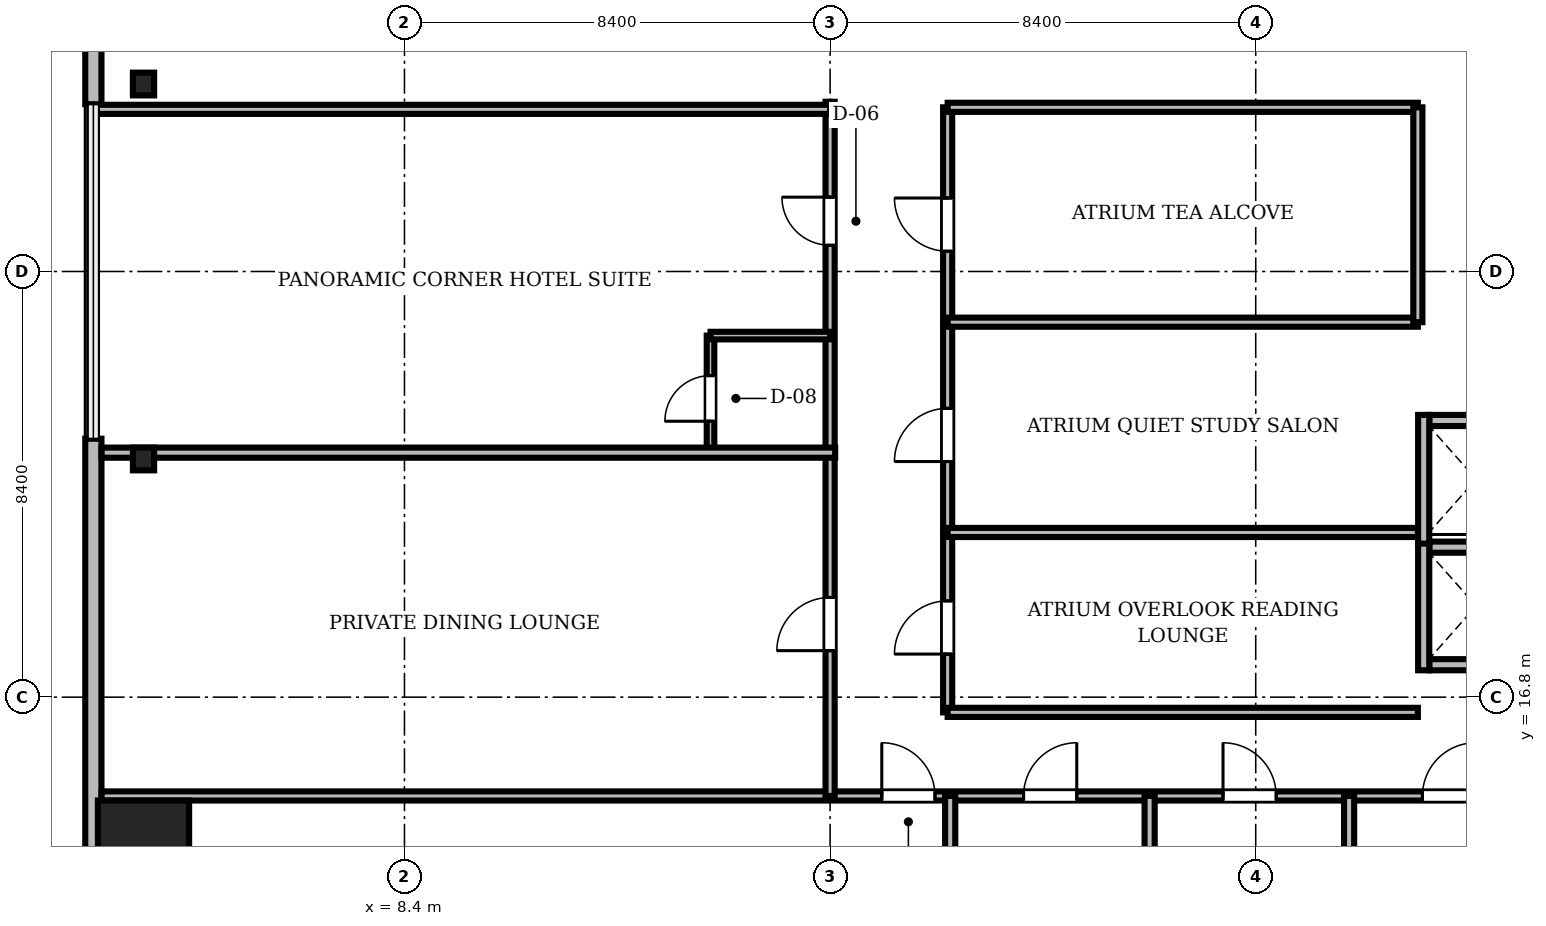
"""IFC4 building model, lengths in metres.
Left out: names, types, materials, properties, quantities, classifications, styles, units other than length and angle.
Written with IfcOpenShell. Run it as: python <this file> out.ifc"""

import sys

from ifc_helpers import new_model, si_unit, direction, frame, frame_2d, origin, origin_2d, place, context, subcontext, project, spatial, rectangle, i_section, extrude, source, transform, mapped, element, fill, save


model = new_model("IFC4")
c1 = context("Model", 3, precision=1e-05, world=origin(), true_north=direction((0.0, 1.0)))
c2 = subcontext(c1, "Body", "Model", "MODEL_VIEW")
j1 = project(units=[si_unit("LENGTHUNIT", "METRE"), si_unit("PLANEANGLEUNIT", "RADIAN")], contexts=[c1])
p1 = place(None, origin())
s1 = spatial("IfcSite", under=j1, at=p1, CompositionType="ELEMENT")
p2 = place(p1, origin())
s2 = spatial("IfcBuilding", under=s1, at=p2, CompositionType="ELEMENT")
p3 = place(p2, frame((0.0, 0.0, 56.8)))
s3 = spatial("IfcBuildingStorey", under=s2, at=p3, CompositionType="ELEMENT", Elevation=56.8)
m1 = source(origin(), c2, "Body", "SweptSolid", [
    extrude(rectangle(XDim=1.8, YDim=1.8, at=origin_2d()), origin(), (0.0, 0.0, 1.0), 3.41),
])
p4 = place(p3, frame((3.25, 13.86, 0.0), z_axis=(0.0, 0.0, 1.0), x_axis=(1.0, 0.0, 0.0)))
e1 = element("IfcColumn", 1, at=p4, inside=s3, PredefinedType="COLUMN", context=c2, shape_type="MappedRepresentation", body=[
    mapped(m1, transform((0.0, 0.0, 0.0), scale=1.0)),
])
m2 = source(origin(), c2, "Body", "SweptSolid", [
    extrude(i_section(OverallWidth=0.419, OverallDepth=0.449, WebThickness=0.031, FlangeThickness=0.048, FilletRadius=0.015, at=origin_2d()), origin(), (0.0, 0.0, 1.0), 3.41),
])
for number, where, z_axis, x_axis in (
    (2, (3.25, 28.9, 0.0), (0.0, 0.0, 1.0), (1.0, 0.0, 0.0)),
    (3, (3.25, 21.5, 0.0), (0.0, 0.0, 1.0), (1.0, 0.0, 0.0)),
):
    element("IfcColumn", number, at=place(p3, frame(where, z_axis=z_axis, x_axis=x_axis)), inside=s3, PredefinedType="COLUMN", context=c2, shape_type="MappedRepresentation", body=[
        mapped(m2, transform((0.0, 0.0, 0.0), scale=1.0)),
    ])
m3 = source(origin(), c2, "Body", "SweptSolid", [
    extrude(rectangle(XDim=15.6, YDim=0.32, at=frame_2d((7.8, 0.0))), origin(), (0.0, 0.0, 1.0), 3.41),
])
p5 = place(p3, frame((2.26, 44.1, 0.0), z_axis=(0.0, 0.0, 1.0), x_axis=(0.0, -1.0, 0.0)))
e4 = element("IfcWall", 4, at=p5, inside=s3, PredefinedType="SOLIDWALL", context=c2, shape_type="MappedRepresentation", body=[
    mapped(m3, transform((0.0, 0.0, 0.0), scale=1.0)),
])
m4 = source(origin(), c2, "Body", "SweptSolid", [
    extrude(rectangle(XDim=1.4, YDim=2.3, at=frame_2d((0.7, 1.15))), frame((0.0, 0.17, 0.0), z_axis=(0.0, -1.0, 0.0), x_axis=(1.0, 0.0, 0.0)), (0.0, 0.0, 1.0), 0.34),
])
p6 = place(p5, frame((9.61, 0.0, 0.0)))
e5 = element("IfcOpeningElement", 5, at=p6, cuts=e4, PredefinedType="OPENING", context=c2, shape_type="MappedRepresentation", body=[
    mapped(m4, transform((0.0, 0.0, 0.0), scale=1.0)),
])
m5 = source(origin(), c2, "Body", "SweptSolid", [
    extrude(rectangle(XDim=2.8, YDim=2.4, at=frame_2d((1.4, 1.2))), frame((0.0, 0.17, 0.0), z_axis=(0.0, -1.0, 0.0), x_axis=(1.0, 0.0, 0.0)), (0.0, 0.0, 1.0), 0.34),
])
p7 = place(p5, frame((2.705, 0.0, 0.72)))
e6 = element("IfcOpeningElement", 6, at=p7, cuts=e4, PredefinedType="OPENING", context=c2, shape_type="MappedRepresentation", body=[
    mapped(m5, transform((0.0, 0.0, 0.0), scale=1.0)),
])
m6 = source(origin(), c2, "Body", "SweptSolid", [
    extrude(rectangle(XDim=15.6, YDim=0.32, at=frame_2d((7.8, 0.0))), origin(), (0.0, 0.0, 1.0), 3.41),
])
p8 = place(p3, frame((2.26, 21.9, 0.0), z_axis=(0.0, 0.0, 1.0), x_axis=(0.0, -1.0, 0.0)))
e7 = element("IfcWall", 7, at=p8, inside=s3, PredefinedType="SOLIDWALL", context=c2, shape_type="MappedRepresentation", body=[
    mapped(m6, transform((0.0, 0.0, 0.0), scale=1.0)),
])
p9 = place(p8, frame((10.095, 0.0, 0.72)))
e8 = element("IfcOpeningElement", 8, at=p9, cuts=e7, PredefinedType="OPENING", context=c2, shape_type="MappedRepresentation", body=[
    mapped(m5, transform((0.0, 0.0, 0.0), scale=1.0)),
])
m7 = source(origin(), c2, "Body", "SweptSolid", [
    extrude(rectangle(XDim=1.85, YDim=0.22, at=frame_2d((0.925, 0.0))), origin(), (0.0, 0.0, 1.0), 3.41),
])
for number, where, z_axis, x_axis in (
    (9, (28.625, 17.44, 0.0), (0.0, 0.0, 1.0), (1.0, 0.0, 0.0)),
    (10, (28.625, 19.76, 0.0), (0.0, 0.0, 1.0), (1.0, 0.0, 0.0)),
):
    element("IfcWall", number, at=place(p3, frame(where, z_axis=z_axis, x_axis=x_axis)), inside=s3, PredefinedType="SOLIDWALL", context=c2, shape_type="MappedRepresentation", body=[
        mapped(m7, transform((0.0, 0.0, 0.0), scale=1.0)),
    ])
m8 = source(origin(), c2, "Body", "SweptSolid", [
    extrude(rectangle(XDim=2.54, YDim=0.22, at=frame_2d((1.27, 0.0))), origin(), (0.0, 0.0, 1.0), 3.41),
])
p10 = place(p3, frame((28.515, 17.33, 0.0), z_axis=(0.0, 0.0, 1.0), x_axis=(0.0, 1.0, 0.0)))
e11 = element("IfcWall", 11, at=p10, inside=s3, PredefinedType="SOLIDWALL", context=c2, shape_type="MappedRepresentation", body=[
    mapped(m8, transform((0.0, 0.0, 0.0), scale=1.0)),
])
p11 = place(p3, frame((28.625, 22.26, 0.0), z_axis=(0.0, 0.0, 1.0), x_axis=(1.0, 0.0, 0.0)))
e12 = element("IfcWall", 12, at=p11, inside=s3, PredefinedType="SOLIDWALL", context=c2, shape_type="MappedRepresentation", body=[
    mapped(m7, transform((0.0, 0.0, 0.0), scale=1.0)),
])
p12 = place(p3, frame((28.515, 19.83, 0.0), z_axis=(0.0, 0.0, 1.0), x_axis=(0.0, 1.0, 0.0)))
e13 = element("IfcWall", 13, at=p12, inside=s3, PredefinedType="SOLIDWALL", context=c2, shape_type="MappedRepresentation", body=[
    mapped(m8, transform((0.0, 0.0, 0.0), scale=1.0)),
])
m9 = source(origin(), c2, "Body", "SweptSolid", [
    extrude(rectangle(XDim=46.156, YDim=0.18, at=frame_2d((23.078, 0.0))), origin(), (0.0, 0.0, 1.0), 2.652),
])
p13 = place(p3, frame((2.422, 14.85, 0.0), z_axis=(0.0, 0.0, 1.0), x_axis=(1.0, 0.0, 0.0)))
e14 = element("IfcWall", 14, at=p13, inside=s3, PredefinedType="PARTITIONING", context=c2, shape_type="MappedRepresentation", body=[
    mapped(m9, transform((0.0, 0.0, 0.0), scale=1.0)),
])
m10 = source(origin(), c2, "Body", "SweptSolid", [
    extrude(rectangle(XDim=1.05, YDim=2.2, at=frame_2d((0.525, 1.1))), frame((0.0, 0.1, 0.0), z_axis=(0.0, -1.0, 0.0), x_axis=(1.0, 0.0, 0.0)), (0.0, 0.0, 1.0), 0.2),
])
p14 = place(p13, frame((15.398, 0.0, 0.0)))
e15 = element("IfcOpeningElement", 15, at=p14, cuts=e14, PredefinedType="OPENING", context=c2, shape_type="MappedRepresentation", body=[
    mapped(m10, transform((0.0, 0.0, 0.0), scale=1.0)),
])
p15 = place(p13, frame((18.196, 0.0, 0.0)))
e16 = element("IfcOpeningElement", 16, at=p15, cuts=e14, PredefinedType="OPENING", context=c2, shape_type="MappedRepresentation", body=[
    mapped(m10, transform((0.0, 0.0, 0.0), scale=1.0)),
])
p16 = place(p13, frame((22.132, 0.0, 0.0)))
e17 = element("IfcOpeningElement", 17, at=p16, cuts=e14, PredefinedType="OPENING", context=c2, shape_type="MappedRepresentation", body=[
    mapped(m10, transform((0.0, 0.0, 0.0), scale=1.0)),
])
p17 = place(p13, frame((26.069, 0.0, 0.0)))
e18 = element("IfcOpeningElement", 18, at=p17, cuts=e14, PredefinedType="OPENING", context=c2, shape_type="MappedRepresentation", body=[
    mapped(m10, transform((0.0, 0.0, 0.0), scale=1.0)),
])
p18 = place(p13, frame((30.005, 0.0, 0.0)))
e19 = element("IfcOpeningElement", 19, at=p18, cuts=e14, PredefinedType="OPENING", context=c2, shape_type="MappedRepresentation", body=[
    mapped(m10, transform((0.0, 0.0, 0.0), scale=1.0)),
])
p19 = place(p13, frame((33.941, 0.0, 0.0)))
e20 = element("IfcOpeningElement", 20, at=p19, cuts=e14, PredefinedType="OPENING", context=c2, shape_type="MappedRepresentation", body=[
    mapped(m10, transform((0.0, 0.0, 0.0), scale=1.0)),
])
p20 = place(p13, frame((37.877, 0.0, 0.0)))
e21 = element("IfcOpeningElement", 21, at=p20, cuts=e14, PredefinedType="OPENING", context=c2, shape_type="MappedRepresentation", body=[
    mapped(m10, transform((0.0, 0.0, 0.0), scale=1.0)),
])
p21 = place(p13, frame((42.727, 0.0, 0.0)))
e22 = element("IfcOpeningElement", 22, at=p21, cuts=e14, PredefinedType="OPENING", context=c2, shape_type="MappedRepresentation", body=[
    mapped(m10, transform((0.0, 0.0, 0.0), scale=1.0)),
])
m11 = source(origin(), c2, "Body", "SweptSolid", [
    extrude(rectangle(XDim=13.7, YDim=0.18, at=frame_2d((6.85, 0.0))), origin(), (0.0, 0.0, 1.0), 2.802),
])
p22 = place(p3, frame((16.8, 14.85, 0.0), z_axis=(0.0, 0.0, 1.0), x_axis=(0.0, 1.0, 0.0)))
e23 = element("IfcWall", 23, at=p22, inside=s3, PredefinedType="PARTITIONING", context=c2, shape_type="MappedRepresentation", body=[
    mapped(m11, transform((0.0, 0.0, 0.0), scale=1.0)),
])
p23 = place(p22, frame((2.867, 0.0, 0.0)))
e24 = element("IfcOpeningElement", 24, at=p23, cuts=e23, PredefinedType="OPENING", context=c2, shape_type="MappedRepresentation", body=[
    mapped(m10, transform((0.0, 0.0, 0.0), scale=1.0)),
])
m12 = source(origin(), c2, "Body", "SweptSolid", [
    extrude(rectangle(XDim=0.95, YDim=2.15, at=frame_2d((0.475, 1.075))), frame((0.0, 0.1, 0.0), z_axis=(0.0, -1.0, 0.0), x_axis=(1.0, 0.0, 0.0)), (0.0, 0.0, 1.0), 0.2),
])
p24 = place(p22, frame((10.867, 0.0, 0.0)))
e25 = element("IfcOpeningElement", 25, at=p24, cuts=e23, PredefinedType="OPENING", context=c2, shape_type="MappedRepresentation", body=[
    mapped(m12, transform((0.0, 0.0, 0.0), scale=1.0)),
])
m13 = source(origin(), c2, "Body", "SweptSolid", [
    extrude(rectangle(XDim=4.24, YDim=0.18, at=frame_2d((2.12, 0.0))), origin(), (0.0, 0.0, 1.0), 2.802),
])
p25 = place(p3, frame((19.12, 24.2, 0.0), z_axis=(0.0, 0.0, 1.0), x_axis=(0.0, 1.0, 0.0)))
e26 = element("IfcWall", 26, at=p25, inside=s3, PredefinedType="PARTITIONING", context=c2, shape_type="MappedRepresentation", body=[
    mapped(m13, transform((0.0, 0.0, 0.0), scale=1.0)),
])
p26 = place(p25, frame((1.4, 0.0, 0.0)))
e27 = element("IfcOpeningElement", 27, at=p26, cuts=e26, PredefinedType="OPENING", context=c2, shape_type="MappedRepresentation", body=[
    mapped(m10, transform((0.0, 0.0, 0.0), scale=1.0)),
])
m14 = source(origin(), c2, "Body", "SweptSolid", [
    extrude(rectangle(XDim=4.15, YDim=0.18, at=frame_2d((2.075, 0.0))), origin(), (0.0, 0.0, 1.0), 3.042),
])
p27 = place(p3, frame((19.12, 20.05, 0.0), z_axis=(0.0, 0.0, 1.0), x_axis=(0.0, 1.0, 0.0)))
e28 = element("IfcWall", 28, at=p27, inside=s3, PredefinedType="PARTITIONING", context=c2, shape_type="MappedRepresentation", body=[
    mapped(m14, transform((0.0, 0.0, 0.0), scale=1.0)),
])
p28 = place(p27, frame((1.4, 0.0, 0.0)))
e29 = element("IfcOpeningElement", 29, at=p28, cuts=e28, PredefinedType="OPENING", context=c2, shape_type="MappedRepresentation", body=[
    mapped(m10, transform((0.0, 0.0, 0.0), scale=1.0)),
])
m15 = source(origin(), c2, "Body", "SweptSolid", [
    extrude(rectangle(XDim=3.55, YDim=0.18, at=frame_2d((1.775, 0.0))), origin(), (0.0, 0.0, 1.0), 2.802),
])
p29 = place(p3, frame((19.12, 16.5, 0.0), z_axis=(0.0, 0.0, 1.0), x_axis=(0.0, 1.0, 0.0)))
e30 = element("IfcWall", 30, at=p29, inside=s3, PredefinedType="PARTITIONING", context=c2, shape_type="MappedRepresentation", body=[
    mapped(m15, transform((0.0, 0.0, 0.0), scale=1.0)),
])
p30 = place(p29, frame((1.15, 0.0, 0.0)))
e31 = element("IfcOpeningElement", 31, at=p30, cuts=e30, PredefinedType="OPENING", context=c2, shape_type="MappedRepresentation", body=[
    mapped(m10, transform((0.0, 0.0, 0.0), scale=1.0)),
])
m16 = source(origin(), c2, "Body", "SweptSolid", [
    extrude(rectangle(XDim=2.29, YDim=0.15, at=frame_2d((1.145, 0.0))), origin(), (0.0, 0.0, 1.0), 3.042),
])
p31 = place(p3, frame((14.44, 21.645, 0.0), z_axis=(0.0, 0.0, 1.0), x_axis=(0.0, 1.0, 0.0)))
e32 = element("IfcWall", 32, at=p31, inside=s3, PredefinedType="PARTITIONING", context=c2, shape_type="MappedRepresentation", body=[
    mapped(m16, transform((0.0, 0.0, 0.0), scale=1.0)),
])
m17 = source(origin(), c2, "Body", "SweptSolid", [
    extrude(rectangle(XDim=0.9, YDim=2.1, at=frame_2d((0.45, 1.05))), frame((0.0, 0.085, 0.0), z_axis=(0.0, -1.0, 0.0), x_axis=(1.0, 0.0, 0.0)), (0.0, 0.0, 1.0), 0.17),
])
p32 = place(p31, frame((0.6, 0.0, 0.0)))
e33 = element("IfcOpeningElement", 33, at=p32, cuts=e32, PredefinedType="OPENING", context=c2, shape_type="MappedRepresentation", body=[
    mapped(m17, transform((0.0, 0.0, 0.0), scale=1.0)),
])
m18 = source(origin(), c2, "Body", "SweptSolid", [
    extrude(rectangle(XDim=14.478, YDim=0.2, at=frame_2d((7.239, 0.0))), origin(), (0.0, 0.0, 1.0), 2.652),
])
p33 = place(p3, frame((2.422, 21.625, 0.0), z_axis=(0.0, 0.0, 1.0), x_axis=(1.0, 0.0, 0.0)))
e34 = element("IfcWall", 34, at=p33, inside=s3, PredefinedType="PARTITIONING", context=c2, shape_type="MappedRepresentation", body=[
    mapped(m18, transform((0.0, 0.0, 0.0), scale=1.0)),
])
m19 = source(origin(), c2, "Body", "SweptSolid", [
    extrude(rectangle(XDim=14.57, YDim=0.18, at=frame_2d((7.285, 0.0))), origin(), (0.0, 0.0, 1.0), 2.652),
])
p34 = place(p3, frame((2.23, 28.4, 0.0), z_axis=(0.0, 0.0, 1.0), x_axis=(1.0, 0.0, 0.0)))
e35 = element("IfcWall", 35, at=p34, inside=s3, PredefinedType="PARTITIONING", context=c2, shape_type="MappedRepresentation", body=[
    mapped(m19, transform((0.0, 0.0, 0.0), scale=1.0)),
])
m20 = source(origin(), c2, "Body", "SweptSolid", [
    extrude(rectangle(XDim=12.728, YDim=0.2, at=frame_2d((6.364, 0.0))), origin(), (0.0, 0.0, 1.0), 2.652),
])
p35 = place(p3, frame((19.17, 2.122, 0.0), z_axis=(0.0, 0.0, 1.0), x_axis=(0.0, 1.0, 0.0)))
e36 = element("IfcWall", 36, at=p35, inside=s3, PredefinedType="PARTITIONING", context=c2, shape_type="MappedRepresentation", body=[
    mapped(m20, transform((0.0, 0.0, 0.0), scale=1.0)),
])
m21 = source(origin(), c2, "Body", "SweptSolid", [
    extrude(rectangle(XDim=12.92, YDim=0.2, at=frame_2d((6.46, 0.0))), origin(), (0.0, 0.0, 1.0), 2.652),
])
for number, where, z_axis, x_axis in (
    (37, (23.106, 1.93, 0.0), (0.0, 0.0, 1.0), (0.0, 1.0, 0.0)),
    (38, (27.043, 1.93, 0.0), (0.0, 0.0, 1.0), (0.0, 1.0, 0.0)),
):
    element("IfcWall", number, at=place(p3, frame(where, z_axis=z_axis, x_axis=x_axis)), inside=s3, PredefinedType="PARTITIONING", context=c2, shape_type="MappedRepresentation", body=[
        mapped(m21, transform((0.0, 0.0, 0.0), scale=1.0)),
    ])
m22 = source(origin(), c2, "Body", "SweptSolid", [
    extrude(rectangle(XDim=9.28, YDim=0.18, at=frame_2d((4.64, 0.0))), origin(), (0.0, 0.0, 1.0), 2.802),
])
p36 = place(p3, frame((19.12, 16.5, 0.0), z_axis=(0.0, 0.0, 1.0), x_axis=(1.0, 0.0, 0.0)))
e39 = element("IfcWall", 39, at=p36, inside=s3, PredefinedType="PARTITIONING", context=c2, shape_type="MappedRepresentation", body=[
    mapped(m22, transform((0.0, 0.0, 0.0), scale=1.0)),
])
m23 = source(origin(), c2, "Body", "SweptSolid", [
    extrude(rectangle(XDim=9.28, YDim=0.18, at=frame_2d((4.64, 0.0))), origin(), (0.0, 0.0, 1.0), 3.41),
])
for number, where, z_axis, x_axis in (
    (40, (19.12, 20.05, 0.0), (0.0, 0.0, 1.0), (1.0, 0.0, 0.0)),
    (41, (19.12, 24.2, 0.0), (0.0, 0.0, 1.0), (1.0, 0.0, 0.0)),
    (42, (19.12, 28.44, 0.0), (0.0, 0.0, 1.0), (1.0, 0.0, 0.0)),
):
    element("IfcWall", number, at=place(p3, frame(where, z_axis=z_axis, x_axis=x_axis)), inside=s3, PredefinedType="PARTITIONING", context=c2, shape_type="MappedRepresentation", body=[
        mapped(m23, transform((0.0, 0.0, 0.0), scale=1.0)),
    ])
p37 = place(p3, frame((28.4, 24.2, 0.0), z_axis=(0.0, 0.0, 1.0), x_axis=(0.0, 1.0, 0.0)))
e43 = element("IfcWall", 43, at=p37, inside=s3, PredefinedType="PARTITIONING", context=c2, shape_type="MappedRepresentation", body=[
    mapped(m13, transform((0.0, 0.0, 0.0), scale=1.0)),
])
m24 = source(origin(), c2, "Body", "SweptSolid", [
    extrude(rectangle(XDim=2.36, YDim=0.15, at=frame_2d((1.18, 0.0))), origin(), (0.0, 0.0, 1.0), 3.41),
])
p38 = place(p3, frame((14.44, 23.935, 0.0), z_axis=(0.0, 0.0, 1.0), x_axis=(1.0, 0.0, 0.0)))
e44 = element("IfcWall", 44, at=p38, inside=s3, PredefinedType="PARTITIONING", context=c2, shape_type="MappedRepresentation", body=[
    mapped(m24, transform((0.0, 0.0, 0.0), scale=1.0)),
])
m25 = source(origin(), c2, "Body", "SweptSolid", [
    extrude(rectangle(XDim=1.05, YDim=2.2, at=frame_2d((0.525, 1.1))), frame((0.0, 0.025, 0.0), z_axis=(0.0, -1.0, 0.0), x_axis=(1.0, 0.0, 0.0)), (0.0, 0.0, 1.0), 0.05),
])
p39 = place(p14, origin())
e45 = element("IfcDoor", 45, at=p39, inside=s3, OperationType="SINGLE_SWING_LEFT", PredefinedType="DOOR", context=c2, shape_type="MappedRepresentation", body=[
    mapped(m25, transform((0.0, 0.0, 0.0), scale=1.0)),
])
fill(e15, e45)
p40 = place(p15, origin())
e46 = element("IfcDoor", 46, at=p40, inside=s3, OperationType="SINGLE_SWING_RIGHT", PredefinedType="DOOR", context=c2, shape_type="MappedRepresentation", body=[
    mapped(m25, transform((0.0, 0.0, 0.0), scale=1.0)),
])
fill(e16, e46)
p41 = place(p16, origin())
e47 = element("IfcDoor", 47, at=p41, inside=s3, OperationType="SINGLE_SWING_LEFT", PredefinedType="DOOR", context=c2, shape_type="MappedRepresentation", body=[
    mapped(m25, transform((0.0, 0.0, 0.0), scale=1.0)),
])
fill(e17, e47)
p42 = place(p17, origin())
e48 = element("IfcDoor", 48, at=p42, inside=s3, OperationType="SINGLE_SWING_RIGHT", PredefinedType="DOOR", context=c2, shape_type="MappedRepresentation", body=[
    mapped(m25, transform((0.0, 0.0, 0.0), scale=1.0)),
])
fill(e18, e48)
p43 = place(p23, origin())
e49 = element("IfcDoor", 49, at=p43, inside=s3, OperationType="SINGLE_SWING_LEFT", PredefinedType="DOOR", context=c2, shape_type="MappedRepresentation", body=[
    mapped(m25, transform((0.0, 0.0, 0.0), scale=1.0)),
])
fill(e24, e49)
m26 = source(origin(), c2, "Body", "SweptSolid", [
    extrude(rectangle(XDim=0.95, YDim=2.15, at=frame_2d((0.475, 1.075))), frame((0.0, 0.025, 0.0), z_axis=(0.0, -1.0, 0.0), x_axis=(1.0, 0.0, 0.0)), (0.0, 0.0, 1.0), 0.05),
])
p44 = place(p24, origin())
e50 = element("IfcDoor", 50, at=p44, inside=s3, OperationType="SINGLE_SWING_RIGHT", PredefinedType="DOOR", context=c2, shape_type="MappedRepresentation", body=[
    mapped(m26, transform((0.0, 0.0, 0.0), scale=1.0)),
])
fill(e25, e50)
p45 = place(p26, origin())
e51 = element("IfcDoor", 51, at=p45, inside=s3, OperationType="SINGLE_SWING_RIGHT", PredefinedType="DOOR", context=c2, shape_type="MappedRepresentation", body=[
    mapped(m25, transform((0.0, 0.0, 0.0), scale=1.0)),
])
fill(e27, e51)
p46 = place(p28, origin())
e52 = element("IfcDoor", 52, at=p46, inside=s3, OperationType="SINGLE_SWING_LEFT", PredefinedType="DOOR", context=c2, shape_type="MappedRepresentation", body=[
    mapped(m25, transform((0.0, 0.0, 0.0), scale=1.0)),
])
fill(e29, e52)
p47 = place(p30, origin())
e53 = element("IfcDoor", 53, at=p47, inside=s3, OperationType="SINGLE_SWING_LEFT", PredefinedType="DOOR", context=c2, shape_type="MappedRepresentation", body=[
    mapped(m25, transform((0.0, 0.0, 0.0), scale=1.0)),
])
fill(e31, e53)
m27 = source(origin(), c2, "Body", "SweptSolid", [
    extrude(rectangle(XDim=0.9, YDim=2.1, at=frame_2d((0.45, 1.05))), frame((0.0, 0.025, 0.0), z_axis=(0.0, -1.0, 0.0), x_axis=(1.0, 0.0, 0.0)), (0.0, 0.0, 1.0), 0.05),
])
p48 = place(p32, origin())
e54 = element("IfcDoor", 54, at=p48, inside=s3, OperationType="SINGLE_SWING_LEFT", PredefinedType="DOOR", context=c2, shape_type="MappedRepresentation", body=[
    mapped(m27, transform((0.0, 0.0, 0.0), scale=1.0)),
])
fill(e33, e54)
save(model, sys.argv[1])
